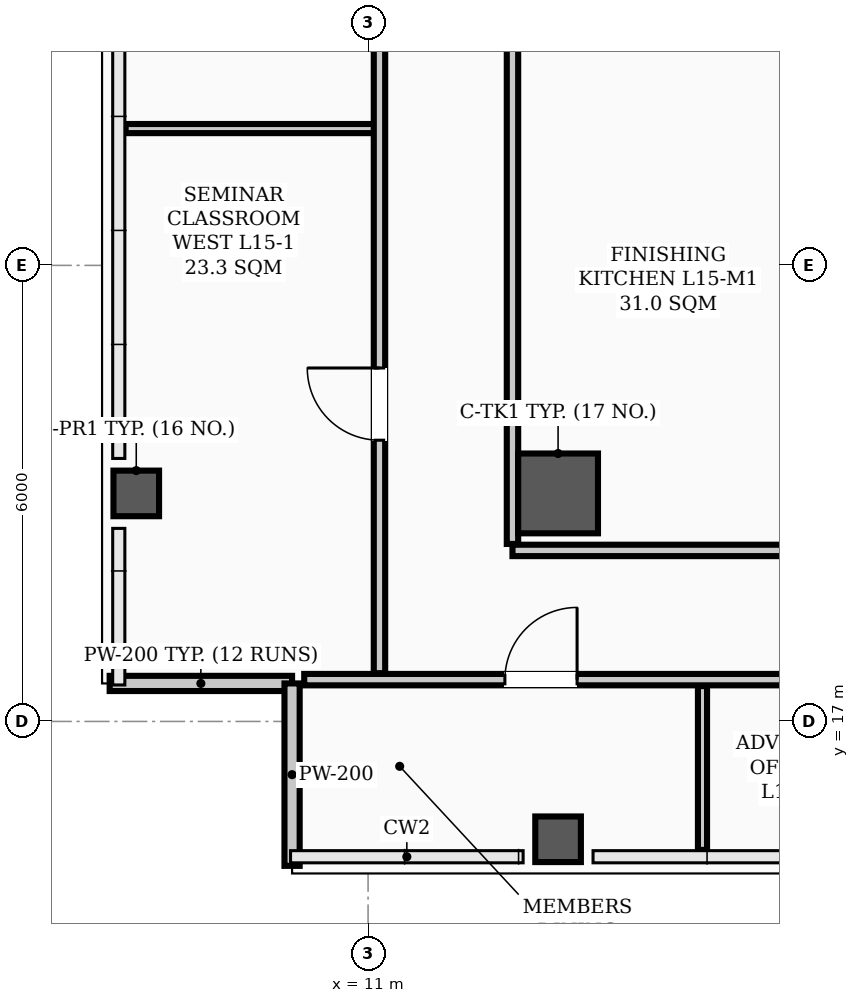
"""IFC4 building model, lengths in metres.
Left out: names, types, materials, properties, quantities, classifications, styles, units other than length and angle.
Written with IfcOpenShell. Run it as: python <this file> out.ifc"""

import sys

from ifc_helpers import new_model, si_unit, direction, frame, frame_2d, origin, origin_2d, place, context, subcontext, project, spatial, rectangle, hollow_rectangle, extrude, element, fill, save


model = new_model("IFC4")
c1 = context("Model", 3, precision=1e-05, world=origin(), true_north=direction((0.0, 1.0)))
c2 = subcontext(c1, "Body", "Model", "MODEL_VIEW")
j1 = project(units=[si_unit("LENGTHUNIT", "METRE"), si_unit("PLANEANGLEUNIT", "RADIAN")], contexts=[c1])
p1 = place(None, origin())
s1 = spatial("IfcSite", under=j1, at=p1, CompositionType="ELEMENT")
p2 = place(p1, origin())
s2 = spatial("IfcBuilding", under=s1, at=p2, CompositionType="ELEMENT")
p3 = place(p2, frame((0.0, 0.0, 61.6)))
s3 = spatial("IfcBuildingStorey", under=s2, at=p3, CompositionType="ELEMENT", Elevation=61.6)
p4 = place(p3, frame((13.5, 20.0, 0.0), z_axis=(0.0, 0.0, 1.0), x_axis=(1.0, 0.0, 0.0)))
e1 = element("IfcColumn", 1, at=p4, inside=s3, PredefinedType="COLUMN", context=c2, shape_type="SweptSolid", body=[
    extrude(hollow_rectangle(XDim=1.05, YDim=1.05, WallThickness=0.038, InnerFilletRadius=0.019, OuterFilletRadius=0.057, at=origin_2d()), origin(), (0.0, 0.0, 1.0), 3.9),
])
for number, where, z_axis, x_axis in (
    (2, (7.95, 20.0, 0.0), (0.0, 0.0, 1.0), (1.0, 0.0, 0.0)),
    (3, (13.5, 15.45, 0.0), (0.0, 0.0, 1.0), (1.0, 0.0, 0.0)),
):
    element("IfcColumn", number, at=place(p3, frame(where, z_axis=z_axis, x_axis=x_axis)), inside=s3, PredefinedType="COLUMN", context=c2, shape_type="SweptSolid", body=[
        extrude(hollow_rectangle(XDim=0.6, YDim=0.6, WallThickness=0.026, InnerFilletRadius=0.013, OuterFilletRadius=0.039, at=origin_2d()), origin(), (0.0, 0.0, 1.0), 3.9),
    ])
for number, where, z_axis, x_axis in (
    (4, (7.6, 17.5, 0.0), (0.0, 0.0, 1.0), (1.0, 0.0, 0.0)),
    (5, (10.0, 17.5, 0.0), (0.0, 0.0, 1.0), (0.0, -1.0, 0.0)),
):
    element("IfcWall", number, at=place(p3, frame(where, z_axis=z_axis, x_axis=x_axis)), inside=s3, PredefinedType="PARAPET", context=c2, shape_type="SweptSolid", body=[
        extrude(rectangle(XDim=2.4, YDim=0.2, at=frame_2d((1.2, 0.0))), origin(), (0.0, 0.0, 1.0), 1.2),
    ])
p5 = place(p3, frame((10.16, 17.55, 0.0), z_axis=(0.0, 0.0, 1.0), x_axis=(1.0, 0.0, 0.0)))
e6 = element("IfcWall", 6, at=p5, inside=s3, PredefinedType="PARTITIONING", context=c2, shape_type="SweptSolid", body=[
    extrude(rectangle(XDim=44.68, YDim=0.15, at=frame_2d((22.34, 0.0))), origin(), (0.0, 0.0, 1.0), 3.1),
])
p6 = place(p5, frame((2.64, 0.0, 0.0)))
e7 = element("IfcOpeningElement", 7, at=p6, cuts=e6, PredefinedType="OPENING", context=c2, shape_type="SweptSolid", body=[
    extrude(rectangle(XDim=0.95, YDim=2.08, at=frame_2d((0.475, 1.04))), frame((0.0, 0.085, 0.0), z_axis=(0.0, -1.0, 0.0), x_axis=(1.0, 0.0, 0.0)), (0.0, 0.0, 1.0), 0.17),
])
p7 = place(p5, frame((8.965, 0.0, 0.0)))
e8 = element("IfcOpeningElement", 8, at=p7, cuts=e6, PredefinedType="OPENING", context=c2, shape_type="SweptSolid", body=[
    extrude(rectangle(XDim=0.95, YDim=2.08, at=frame_2d((0.475, 1.04))), frame((0.0, 0.085, 0.0), z_axis=(0.0, -1.0, 0.0), x_axis=(1.0, 0.0, 0.0)), (0.0, 0.0, 1.0), 0.17),
])
p8 = place(p5, frame((23.815, 0.0, 0.0)))
e9 = element("IfcOpeningElement", 9, at=p8, cuts=e6, PredefinedType="OPENING", context=c2, shape_type="SweptSolid", body=[
    extrude(rectangle(XDim=0.95, YDim=2.08, at=frame_2d((0.475, 1.04))), frame((0.0, 0.085, 0.0), z_axis=(0.0, -1.0, 0.0), x_axis=(1.0, 0.0, 0.0)), (0.0, 0.0, 1.0), 0.17),
])
p9 = place(p5, frame((33.44, 0.0, 0.0)))
e10 = element("IfcOpeningElement", 10, at=p9, cuts=e6, PredefinedType="OPENING", context=c2, shape_type="SweptSolid", body=[
    extrude(rectangle(XDim=0.95, YDim=2.08, at=frame_2d((0.475, 1.04))), frame((0.0, 0.085, 0.0), z_axis=(0.0, -1.0, 0.0), x_axis=(1.0, 0.0, 0.0)), (0.0, 0.0, 1.0), 0.17),
])
p10 = place(p3, frame((12.9, 19.25, 0.0), z_axis=(0.0, 0.0, 1.0), x_axis=(1.0, 0.0, 0.0)))
e11 = element("IfcWall", 11, at=p10, inside=s3, PredefinedType="PARTITIONING", context=c2, shape_type="SweptSolid", body=[
    extrude(rectangle(XDim=13.3, YDim=0.15, at=frame_2d((6.65, 0.0))), origin(), (0.0, 0.0, 1.0), 3.1),
])
p11 = place(p3, frame((7.81, 24.8, 0.0), z_axis=(0.0, 0.0, 1.0), x_axis=(1.0, 0.0, 0.0)))
e12 = element("IfcWall", 12, at=p11, inside=s3, PredefinedType="PARTITIONING", context=c2, shape_type="SweptSolid", body=[
    extrude(rectangle(XDim=3.34, YDim=0.12, at=frame_2d((1.67, 0.0))), origin(), (0.0, 0.0, 1.0), 3.212),
])
p12 = place(p3, frame((11.15, 17.635, 0.0), z_axis=(0.0, 0.0, 1.0), x_axis=(0.0, 1.0, 0.0)))
e13 = element("IfcWall", 13, at=p12, inside=s3, PredefinedType="PARTITIONING", context=c2, shape_type="SweptSolid", body=[
    extrude(rectangle(XDim=22.53, YDim=0.15, at=frame_2d((11.265, 0.0))), origin(), (0.0, 0.0, 1.0), 3.0),
])
p13 = place(p12, frame((3.065, 0.0, 0.0)))
e14 = element("IfcOpeningElement", 14, at=p13, cuts=e13, PredefinedType="OPENING", context=c2, shape_type="SweptSolid", body=[
    extrude(rectangle(XDim=0.95, YDim=2.08, at=frame_2d((0.475, 1.04))), frame((0.0, 0.085, 0.0), z_axis=(0.0, -1.0, 0.0), x_axis=(1.0, 0.0, 0.0)), (0.0, 0.0, 1.0), 0.17),
])
p14 = place(p12, frame((9.09, 0.0, 0.0)))
e15 = element("IfcOpeningElement", 15, at=p14, cuts=e13, PredefinedType="OPENING", context=c2, shape_type="SweptSolid", body=[
    extrude(rectangle(XDim=0.95, YDim=2.08, at=frame_2d((0.475, 1.04))), frame((0.0, 0.085, 0.0), z_axis=(0.0, -1.0, 0.0), x_axis=(1.0, 0.0, 0.0)), (0.0, 0.0, 1.0), 0.17),
])
p15 = place(p12, frame((14.09, 0.0, 0.0)))
e16 = element("IfcOpeningElement", 16, at=p15, cuts=e13, PredefinedType="OPENING", context=c2, shape_type="SweptSolid", body=[
    extrude(rectangle(XDim=0.95, YDim=2.08, at=frame_2d((0.475, 1.04))), frame((0.0, 0.085, 0.0), z_axis=(0.0, -1.0, 0.0), x_axis=(1.0, 0.0, 0.0)), (0.0, 0.0, 1.0), 0.17),
])
p16 = place(p12, frame((19.415, 0.0, 0.0)))
e17 = element("IfcOpeningElement", 17, at=p16, cuts=e13, PredefinedType="OPENING", context=c2, shape_type="SweptSolid", body=[
    extrude(rectangle(XDim=0.95, YDim=2.08, at=frame_2d((0.475, 1.04))), frame((0.0, 0.085, 0.0), z_axis=(0.0, -1.0, 0.0), x_axis=(1.0, 0.0, 0.0)), (0.0, 0.0, 1.0), 0.17),
])
p17 = place(p3, frame((12.9, 19.335, 0.0), z_axis=(0.0, 0.0, 1.0), x_axis=(0.0, 1.0, 0.0)))
e18 = element("IfcWall", 18, at=p17, inside=s3, PredefinedType="PARTITIONING", context=c2, shape_type="SweptSolid", body=[
    extrude(rectangle(XDim=7.38, YDim=0.15, at=frame_2d((3.69, 0.0))), origin(), (0.0, 0.0, 1.0), 3.0),
])
p18 = place(p3, frame((15.4, 15.31, 0.0), z_axis=(0.0, 0.0, 1.0), x_axis=(0.0, 1.0, 0.0)))
e19 = element("IfcWall", 19, at=p18, inside=s3, PredefinedType="PARTITIONING", context=c2, shape_type="SweptSolid", body=[
    extrude(rectangle(XDim=2.155, YDim=0.12, at=frame_2d((1.078, 0.0))), origin(), (0.0, 0.0, 1.0), 3.212),
])
p19 = place(p6, origin())
e20 = element("IfcDoor", 20, at=p19, inside=s3, OperationType="SINGLE_SWING_RIGHT", PredefinedType="DOOR", context=c2, shape_type="SweptSolid", body=[
    extrude(rectangle(XDim=0.95, YDim=2.08, at=frame_2d((0.475, 1.04))), frame((0.0, 0.025, 0.0), z_axis=(0.0, -1.0, 0.0), x_axis=(1.0, 0.0, 0.0)), (0.0, 0.0, 1.0), 0.05),
])
fill(e7, e20)
p20 = place(p13, origin())
e21 = element("IfcDoor", 21, at=p20, inside=s3, OperationType="SINGLE_SWING_RIGHT", PredefinedType="DOOR", context=c2, shape_type="SweptSolid", body=[
    extrude(rectangle(XDim=0.95, YDim=2.08, at=frame_2d((0.475, 1.04))), frame((0.0, 0.025, 0.0), z_axis=(0.0, -1.0, 0.0), x_axis=(1.0, 0.0, 0.0)), (0.0, 0.0, 1.0), 0.05),
])
fill(e14, e21)
save(model, sys.argv[1])
